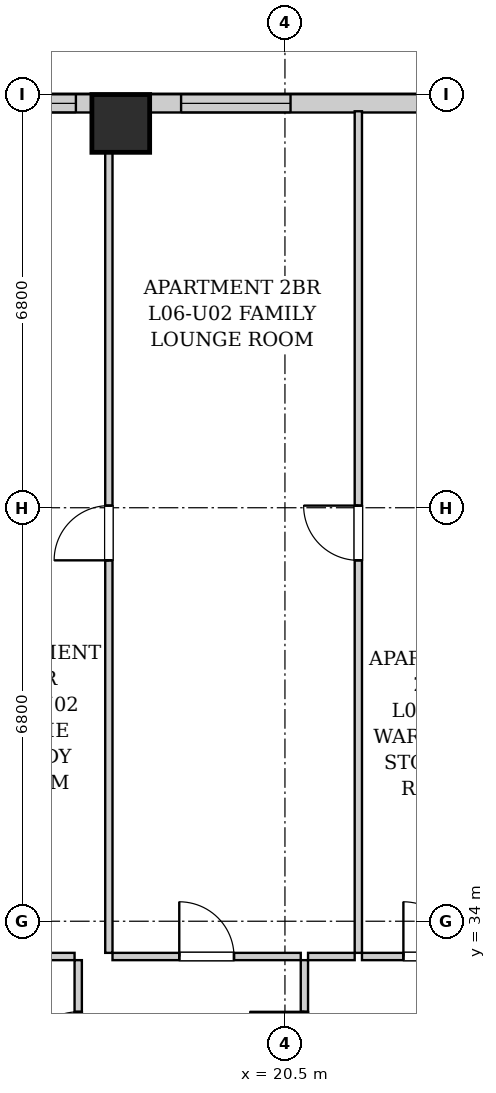
"""IFC4 building model, lengths in metres.
Left out: names, types, materials, properties, quantities, classifications, styles, units other than length and angle.
Written with IfcOpenShell. Run it as: python <this file> out.ifc"""

import sys

from ifc_helpers import new_model, si_unit, direction, frame, frame_2d, origin, origin_2d, place, context, subcontext, project, spatial, rectangle, extrude, element, fill, save


model = new_model("IFC4")
c1 = context("Model", 3, precision=1e-05, world=origin(), true_north=direction((0.0, 1.0)))
c2 = subcontext(c1, "Body", "Model", "MODEL_VIEW")
j1 = project(units=[si_unit("LENGTHUNIT", "METRE"), si_unit("PLANEANGLEUNIT", "RADIAN")], contexts=[c1])
p1 = place(None, origin())
s1 = spatial("IfcSite", under=j1, at=p1, CompositionType="ELEMENT")
p2 = place(p1, origin())
s2 = spatial("IfcBuilding", under=s1, at=p2, CompositionType="ELEMENT")
p3 = place(p2, frame((0.0, 0.0, 29.0)))
s3 = spatial("IfcBuildingStorey", under=s2, at=p3, CompositionType="ELEMENT", Elevation=29.0)
p4 = place(p3, frame((17.8, 47.12, 0.0), z_axis=(0.0, 0.0, 1.0), x_axis=(1.0, 0.0, 0.0)))
e1 = element("IfcColumn", 1, at=p4, inside=s3, PredefinedType="COLUMN", context=c2, shape_type="SweptSolid", body=[
    extrude(rectangle(XDim=0.95, YDim=0.95, at=origin_2d()), origin(), (0.0, 0.0, 1.0), 3.2),
])
p5 = place(p3, frame((10.0, 47.45, 0.0), z_axis=(0.0, 0.0, 1.0), x_axis=(1.0, 0.0, 0.0)))
e2 = element("IfcWall", 2, at=p5, inside=s3, PredefinedType="SOLIDWALL", context=c2, shape_type="SweptSolid", body=[
    extrude(rectangle(XDim=28.1, YDim=0.3, at=frame_2d((14.05, 0.0))), origin(), (0.0, 0.0, 1.0), 1.975),
])
p6 = place(p5, frame((5.712, 0.0, 0.55)))
e3 = element("IfcOpeningElement", 3, at=p6, cuts=e2, PredefinedType="OPENING", context=c2, shape_type="SweptSolid", body=[
    extrude(rectangle(XDim=1.35, YDim=1.2, at=frame_2d((0.675, 0.6))), frame((0.0, 0.16, 0.0), z_axis=(0.0, -1.0, 0.0), x_axis=(1.0, 0.0, 0.0)), (0.0, 0.0, 1.0), 0.32),
])
p7 = place(p5, frame((8.792, 0.0, 0.55)))
e4 = element("IfcOpeningElement", 4, at=p7, cuts=e2, PredefinedType="OPENING", context=c2, shape_type="SweptSolid", body=[
    extrude(rectangle(XDim=1.8, YDim=1.2, at=frame_2d((0.9, 0.6))), frame((0.0, 0.16, 0.0), z_axis=(0.0, -1.0, 0.0), x_axis=(1.0, 0.0, 0.0)), (0.0, 0.0, 1.0), 0.32),
])
p8 = place(p5, frame((18.86, 0.0, 0.55)))
e5 = element("IfcOpeningElement", 5, at=p8, cuts=e2, PredefinedType="OPENING", context=c2, shape_type="SweptSolid", body=[
    extrude(rectangle(XDim=1.8, YDim=1.2, at=frame_2d((0.9, 0.6))), frame((0.0, 0.16, 0.0), z_axis=(0.0, -1.0, 0.0), x_axis=(1.0, 0.0, 0.0)), (0.0, 0.0, 1.0), 0.32),
])
p9 = place(p5, frame((21.215, 0.0, 0.55)))
e6 = element("IfcOpeningElement", 6, at=p9, cuts=e2, PredefinedType="OPENING", context=c2, shape_type="SweptSolid", body=[
    extrude(rectangle(XDim=1.35, YDim=1.2, at=frame_2d((0.675, 0.6))), frame((0.0, 0.16, 0.0), z_axis=(0.0, -1.0, 0.0), x_axis=(1.0, 0.0, 0.0)), (0.0, 0.0, 1.0), 0.32),
])
p10 = place(p5, frame((23.969, 0.0, 0.55)))
e7 = element("IfcOpeningElement", 7, at=p10, cuts=e2, PredefinedType="OPENING", context=c2, shape_type="SweptSolid", body=[
    extrude(rectangle(XDim=1.8, YDim=1.2, at=frame_2d((0.9, 0.6))), frame((0.0, 0.16, 0.0), z_axis=(0.0, -1.0, 0.0), x_axis=(1.0, 0.0, 0.0)), (0.0, 0.0, 1.0), 0.32),
])
p11 = place(p5, frame((26.698, 0.0, 0.55)))
e8 = element("IfcOpeningElement", 8, at=p11, cuts=e2, PredefinedType="OPENING", context=c2, shape_type="SweptSolid", body=[
    extrude(rectangle(XDim=0.85, YDim=1.2, at=frame_2d((0.425, 0.6))), frame((0.0, 0.16, 0.0), z_axis=(0.0, -1.0, 0.0), x_axis=(1.0, 0.0, 0.0)), (0.0, 0.0, 1.0), 0.32),
])
p12 = place(p3, frame((17.1, 30.76, 0.0), z_axis=(0.0, 0.0, 1.0), x_axis=(0.0, 1.0, 0.0)))
e9 = element("IfcWall", 9, at=p12, inside=s3, PredefinedType="PARTITIONING", context=c2, shape_type="SweptSolid", body=[
    extrude(rectangle(XDim=2.6, YDim=0.12, at=frame_2d((1.3, 0.0))), origin(), (0.0, 0.0, 1.0), 2.94),
])
p13 = place(p12, frame((0.85, 0.0, 0.0)))
e10 = element("IfcOpeningElement", 10, at=p13, cuts=e9, PredefinedType="OPENING", context=c2, shape_type="SweptSolid", body=[
    extrude(rectangle(XDim=0.9, YDim=2.05, at=frame_2d((0.45, 1.025))), frame((0.0, 0.07, 0.0), z_axis=(0.0, -1.0, 0.0), x_axis=(1.0, 0.0, 0.0)), (0.0, 0.0, 1.0), 0.14),
])
p14 = place(p3, frame((15.227, 33.42, 0.0), z_axis=(0.0, 0.0, 1.0), x_axis=(1.0, 0.0, 0.0)))
e11 = element("IfcWall", 11, at=p14, inside=s3, PredefinedType="PARTITIONING", context=c2, shape_type="SweptSolid", body=[
    extrude(rectangle(XDim=1.813, YDim=0.12, at=frame_2d((0.906, 0.0))), origin(), (0.0, 0.0, 1.0), 2.94),
])
p15 = place(p14, frame((0.456, 0.0, 0.0)))
e12 = element("IfcOpeningElement", 12, at=p15, cuts=e11, PredefinedType="OPENING", context=c2, shape_type="SweptSolid", body=[
    extrude(rectangle(XDim=0.9, YDim=2.05, at=frame_2d((0.45, 1.025))), frame((0.0, 0.07, 0.0), z_axis=(0.0, -1.0, 0.0), x_axis=(1.0, 0.0, 0.0)), (0.0, 0.0, 1.0), 0.14),
])
p16 = place(p3, frame((20.82, 30.76, 0.0), z_axis=(0.0, 0.0, 1.0), x_axis=(0.0, 1.0, 0.0)))
e13 = element("IfcWall", 13, at=p16, inside=s3, PredefinedType="PARTITIONING", context=c2, shape_type="SweptSolid", body=[
    extrude(rectangle(XDim=2.6, YDim=0.12, at=frame_2d((1.3, 0.0))), origin(), (0.0, 0.0, 1.0), 2.94),
])
p17 = place(p16, frame((0.85, 0.0, 0.0)))
e14 = element("IfcOpeningElement", 14, at=p17, cuts=e13, PredefinedType="OPENING", context=c2, shape_type="SweptSolid", body=[
    extrude(rectangle(XDim=0.9, YDim=2.05, at=frame_2d((0.45, 1.025))), frame((0.0, 0.07, 0.0), z_axis=(0.0, -1.0, 0.0), x_axis=(1.0, 0.0, 0.0)), (0.0, 0.0, 1.0), 0.14),
])
p18 = place(p3, frame((17.664, 33.42, 0.0), z_axis=(0.0, 0.0, 1.0), x_axis=(1.0, 0.0, 0.0)))
e15 = element("IfcWall", 15, at=p18, inside=s3, PredefinedType="PARTITIONING", context=c2, shape_type="SweptSolid", body=[
    extrude(rectangle(XDim=3.096, YDim=0.12, at=frame_2d((1.548, 0.0))), origin(), (0.0, 0.0, 1.0), 2.94),
])
p19 = place(p18, frame((1.098, 0.0, 0.0)))
e16 = element("IfcOpeningElement", 16, at=p19, cuts=e15, PredefinedType="OPENING", context=c2, shape_type="SweptSolid", body=[
    extrude(rectangle(XDim=0.9, YDim=2.05, at=frame_2d((0.45, 1.025))), frame((0.0, 0.07, 0.0), z_axis=(0.0, -1.0, 0.0), x_axis=(1.0, 0.0, 0.0)), (0.0, 0.0, 1.0), 0.14),
])
p20 = place(p3, frame((20.88, 33.42, 0.0), z_axis=(0.0, 0.0, 1.0), x_axis=(1.0, 0.0, 0.0)))
e17 = element("IfcWall", 17, at=p20, inside=s3, PredefinedType="PARTITIONING", context=c2, shape_type="SweptSolid", body=[
    extrude(rectangle(XDim=0.767, YDim=0.12, at=frame_2d((0.384, 0.0))), origin(), (0.0, 0.0, 1.0), 2.94),
])
p21 = place(p3, frame((21.767, 33.42, 0.0), z_axis=(0.0, 0.0, 1.0), x_axis=(1.0, 0.0, 0.0)))
e18 = element("IfcWall", 18, at=p21, inside=s3, PredefinedType="PARTITIONING", context=c2, shape_type="SweptSolid", body=[
    extrude(rectangle(XDim=2.263, YDim=0.12, at=frame_2d((1.131, 0.0))), origin(), (0.0, 0.0, 1.0), 2.94),
])
p22 = place(p21, frame((0.681, 0.0, 0.0)))
e19 = element("IfcOpeningElement", 19, at=p22, cuts=e18, PredefinedType="OPENING", context=c2, shape_type="SweptSolid", body=[
    extrude(rectangle(XDim=0.9, YDim=2.05, at=frame_2d((0.45, 1.025))), frame((0.0, 0.07, 0.0), z_axis=(0.0, -1.0, 0.0), x_axis=(1.0, 0.0, 0.0)), (0.0, 0.0, 1.0), 0.14),
])
p23 = place(p3, frame((17.604, 33.48, 0.0), z_axis=(0.0, 0.0, 1.0), x_axis=(0.0, 1.0, 0.0)))
e20 = element("IfcWall", 20, at=p23, inside=s3, PredefinedType="PARTITIONING", context=c2, shape_type="SweptSolid", body=[
    extrude(rectangle(XDim=13.84, YDim=0.12, at=frame_2d((6.92, 0.0))), origin(), (0.0, 0.0, 1.0), 2.94),
])
p24 = place(p23, frame((6.455, 0.0, 0.0)))
e21 = element("IfcOpeningElement", 21, at=p24, cuts=e20, PredefinedType="OPENING", context=c2, shape_type="SweptSolid", body=[
    extrude(rectangle(XDim=0.9, YDim=2.05, at=frame_2d((0.45, 1.025))), frame((0.0, 0.07, 0.0), z_axis=(0.0, -1.0, 0.0), x_axis=(1.0, 0.0, 0.0)), (0.0, 0.0, 1.0), 0.14),
])
p25 = place(p3, frame((21.707, 33.48, 0.0), z_axis=(0.0, 0.0, 1.0), x_axis=(0.0, 1.0, 0.0)))
e22 = element("IfcWall", 22, at=p25, inside=s3, PredefinedType="PARTITIONING", context=c2, shape_type="SweptSolid", body=[
    extrude(rectangle(XDim=13.84, YDim=0.12, at=frame_2d((6.92, 0.0))), origin(), (0.0, 0.0, 1.0), 2.94),
])
p26 = place(p25, frame((6.455, 0.0, 0.0)))
e23 = element("IfcOpeningElement", 23, at=p26, cuts=e22, PredefinedType="OPENING", context=c2, shape_type="SweptSolid", body=[
    extrude(rectangle(XDim=0.9, YDim=2.05, at=frame_2d((0.45, 1.025))), frame((0.0, 0.07, 0.0), z_axis=(0.0, -1.0, 0.0), x_axis=(1.0, 0.0, 0.0)), (0.0, 0.0, 1.0), 0.14),
])
p27 = place(p13, origin())
e24 = element("IfcDoor", 24, at=p27, inside=s3, OperationType="SINGLE_SWING_LEFT", PredefinedType="DOOR", context=c2, shape_type="SweptSolid", body=[
    extrude(rectangle(XDim=0.9, YDim=2.05, at=frame_2d((0.45, 1.025))), frame((0.0, 0.025, 0.0), z_axis=(0.0, -1.0, 0.0), x_axis=(1.0, 0.0, 0.0)), (0.0, 0.0, 1.0), 0.05),
])
fill(e10, e24)
p28 = place(p17, origin())
e25 = element("IfcDoor", 25, at=p28, inside=s3, OperationType="SINGLE_SWING_RIGHT", PredefinedType="DOOR", context=c2, shape_type="SweptSolid", body=[
    extrude(rectangle(XDim=0.9, YDim=2.05, at=frame_2d((0.45, 1.025))), frame((0.0, 0.025, 0.0), z_axis=(0.0, -1.0, 0.0), x_axis=(1.0, 0.0, 0.0)), (0.0, 0.0, 1.0), 0.05),
])
fill(e14, e25)
p29 = place(p19, origin())
e26 = element("IfcDoor", 26, at=p29, inside=s3, OperationType="SINGLE_SWING_LEFT", PredefinedType="DOOR", context=c2, shape_type="SweptSolid", body=[
    extrude(rectangle(XDim=0.9, YDim=2.05, at=frame_2d((0.45, 1.025))), frame((0.0, 0.025, 0.0), z_axis=(0.0, -1.0, 0.0), x_axis=(1.0, 0.0, 0.0)), (0.0, 0.0, 1.0), 0.05),
])
fill(e16, e26)
p30 = place(p22, origin())
e27 = element("IfcDoor", 27, at=p30, inside=s3, OperationType="SINGLE_SWING_LEFT", PredefinedType="DOOR", context=c2, shape_type="SweptSolid", body=[
    extrude(rectangle(XDim=0.9, YDim=2.05, at=frame_2d((0.45, 1.025))), frame((0.0, 0.025, 0.0), z_axis=(0.0, -1.0, 0.0), x_axis=(1.0, 0.0, 0.0)), (0.0, 0.0, 1.0), 0.05),
])
fill(e19, e27)
p31 = place(p24, origin())
e28 = element("IfcDoor", 28, at=p31, inside=s3, OperationType="SINGLE_SWING_LEFT", PredefinedType="DOOR", context=c2, shape_type="SweptSolid", body=[
    extrude(rectangle(XDim=0.9, YDim=2.05, at=frame_2d((0.45, 1.025))), frame((0.0, 0.025, 0.0), z_axis=(0.0, -1.0, 0.0), x_axis=(1.0, 0.0, 0.0)), (0.0, 0.0, 1.0), 0.05),
])
fill(e21, e28)
p32 = place(p26, origin())
e29 = element("IfcDoor", 29, at=p32, inside=s3, OperationType="SINGLE_SWING_RIGHT", PredefinedType="DOOR", context=c2, shape_type="SweptSolid", body=[
    extrude(rectangle(XDim=0.9, YDim=2.05, at=frame_2d((0.45, 1.025))), frame((0.0, 0.025, 0.0), z_axis=(0.0, -1.0, 0.0), x_axis=(1.0, 0.0, 0.0)), (0.0, 0.0, 1.0), 0.05),
])
fill(e23, e29)
p33 = place(p6, origin())
e30 = element("IfcWindow", 30, at=p33, inside=s3, PartitioningType="SINGLE_PANEL", PredefinedType="WINDOW", context=c2, shape_type="SweptSolid", body=[
    extrude(rectangle(XDim=1.35, YDim=1.2, at=frame_2d((0.675, 0.6))), frame((0.0, 0.03, 0.0), z_axis=(0.0, -1.0, 0.0), x_axis=(1.0, 0.0, 0.0)), (0.0, 0.0, 1.0), 0.06),
])
fill(e3, e30)
p34 = place(p7, origin())
e31 = element("IfcWindow", 31, at=p34, inside=s3, PartitioningType="DOUBLE_PANEL_VERTICAL", PredefinedType="WINDOW", context=c2, shape_type="SweptSolid", body=[
    extrude(rectangle(XDim=1.8, YDim=1.2, at=frame_2d((0.9, 0.6))), frame((0.0, 0.03, 0.0), z_axis=(0.0, -1.0, 0.0), x_axis=(1.0, 0.0, 0.0)), (0.0, 0.0, 1.0), 0.06),
])
fill(e4, e31)
save(model, sys.argv[1])
